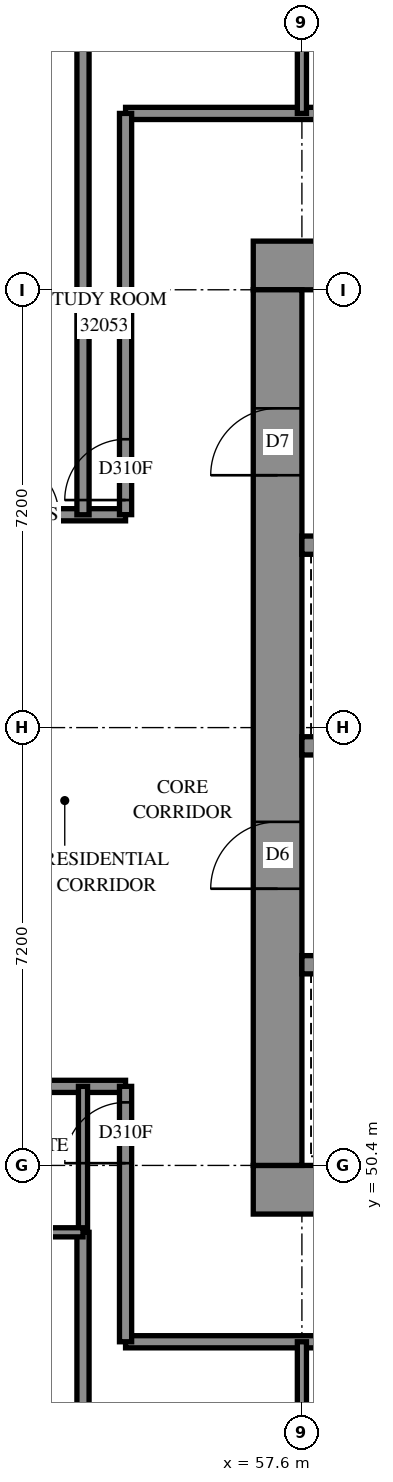
"""IFC4 building model, lengths in metres.
Left out: names, types, materials, properties, quantities, classifications, styles, units other than length and angle.
Written with IfcOpenShell. Run it as: python <this file> out.ifc"""

import sys

from ifc_helpers import new_model, si_unit, direction, frame, frame_2d, origin, place, context, subcontext, project, spatial, rectangle, extrude, element, fill, save


model = new_model("IFC4")
c1 = context("Model", 3, precision=1e-05, world=origin(), true_north=direction((0.0, 1.0)))
c2 = subcontext(c1, "Body", "Model", "MODEL_VIEW")
j1 = project(units=[si_unit("LENGTHUNIT", "METRE"), si_unit("PLANEANGLEUNIT", "RADIAN")], contexts=[c1])
p1 = place(None, origin())
s1 = spatial("IfcSite", under=j1, at=p1, CompositionType="ELEMENT")
p2 = place(p1, origin())
s2 = spatial("IfcBuilding", under=s1, at=p2, CompositionType="ELEMENT")
p3 = place(p2, frame((0.0, 0.0, 118.6)))
s3 = spatial("IfcBuildingStorey", under=s2, at=p3, CompositionType="ELEMENT", Elevation=118.6)
p4 = place(p3, frame((56.8, 50.0, -0.3), z_axis=(0.0, 0.0, 1.0), x_axis=(1.0, 0.0, 0.0)))
e1 = element("IfcWall", 1, at=p4, inside=s3, PredefinedType="SHEAR", context=c2, shape_type="SweptSolid", body=[
    extrude(rectangle(XDim=16.0, YDim=0.8, at=frame_2d((8.0, 0.0))), origin(), (0.0, 0.0, 1.0), 2.7),
])
p5 = place(p3, frame((56.8, 65.2, -0.3), z_axis=(0.0, 0.0, 1.0), x_axis=(1.0, 0.0, 0.0)))
e2 = element("IfcWall", 2, at=p5, inside=s3, PredefinedType="SHEAR", context=c2, shape_type="SweptSolid", body=[
    extrude(rectangle(XDim=16.0, YDim=0.8, at=frame_2d((8.0, 0.0))), origin(), (0.0, 0.0, 1.0), 2.7),
])
p6 = place(p5, frame((10.8, 0.0, 0.3)))
e3 = element("IfcOpeningElement", 3, at=p6, cuts=e2, PredefinedType="OPENING", context=c2, shape_type="SweptSolid", body=[
    extrude(rectangle(XDim=0.8, YDim=2.1, at=frame_2d((0.4, 1.05))), frame((0.0, 0.41, 0.0), z_axis=(0.0, -1.0, 0.0), x_axis=(1.0, 0.0, 0.0)), (0.0, 0.0, 1.0), 0.82),
])
p7 = place(p3, frame((57.2, 50.4, -0.3), z_axis=(0.0, 0.0, 1.0), x_axis=(0.0, 1.0, 0.0)))
e4 = element("IfcWall", 4, at=p7, inside=s3, PredefinedType="SHEAR", context=c2, shape_type="SweptSolid", body=[
    extrude(rectangle(XDim=14.4, YDim=0.8, at=frame_2d((7.2, 0.0))), origin(), (0.0, 0.0, 1.0), 2.7),
])
p8 = place(p7, frame((4.55, 0.0, 0.3)))
e5 = element("IfcOpeningElement", 5, at=p8, cuts=e4, PredefinedType="OPENING", context=c2, shape_type="SweptSolid", body=[
    extrude(rectangle(XDim=1.1, YDim=2.1, at=frame_2d((0.55, 1.05))), frame((0.0, 0.41, 0.0), z_axis=(0.0, -1.0, 0.0), x_axis=(1.0, 0.0, 0.0)), (0.0, 0.0, 1.0), 0.82),
])
p9 = place(p7, frame((11.35, 0.0, 0.3)))
e6 = element("IfcOpeningElement", 6, at=p9, cuts=e4, PredefinedType="OPENING", context=c2, shape_type="SweptSolid", body=[
    extrude(rectangle(XDim=1.1, YDim=2.1, at=frame_2d((0.55, 1.05))), frame((0.0, 0.41, 0.0), z_axis=(0.0, -1.0, 0.0), x_axis=(1.0, 0.0, 0.0)), (0.0, 0.0, 1.0), 0.82),
])
p10 = place(p3, frame((57.6, 53.7, 0.0), z_axis=(0.0, 0.0, 1.0), x_axis=(1.0, 0.0, 0.0)))
e7 = element("IfcWall", 7, at=p10, inside=s3, PredefinedType="SOLIDWALL", context=c2, shape_type="SweptSolid", body=[
    extrude(rectangle(XDim=14.4, YDim=0.3, at=frame_2d((7.2, 0.0))), origin(), (0.0, 0.0, 1.0), 3.1),
])
p11 = place(p10, frame((1.25, 0.0, 0.0)))
e8 = element("IfcOpeningElement", 8, at=p11, cuts=e7, PredefinedType="OPENING", context=c2, shape_type="SweptSolid", body=[
    extrude(rectangle(XDim=1.1, YDim=2.1, at=frame_2d((0.55, 1.05))), frame((0.0, 0.16, 0.0), z_axis=(0.0, -1.0, 0.0), x_axis=(1.0, 0.0, 0.0)), (0.0, 0.0, 1.0), 0.32),
])
p12 = place(p10, frame((4.85, 0.0, 0.0)))
e9 = element("IfcOpeningElement", 9, at=p12, cuts=e7, PredefinedType="OPENING", context=c2, shape_type="SweptSolid", body=[
    extrude(rectangle(XDim=1.1, YDim=2.1, at=frame_2d((0.55, 1.05))), frame((0.0, 0.16, 0.0), z_axis=(0.0, -1.0, 0.0), x_axis=(1.0, 0.0, 0.0)), (0.0, 0.0, 1.0), 0.32),
])
p13 = place(p10, frame((8.45, 0.0, 0.0)))
e10 = element("IfcOpeningElement", 10, at=p13, cuts=e7, PredefinedType="OPENING", context=c2, shape_type="SweptSolid", body=[
    extrude(rectangle(XDim=1.1, YDim=2.1, at=frame_2d((0.55, 1.05))), frame((0.0, 0.16, 0.0), z_axis=(0.0, -1.0, 0.0), x_axis=(1.0, 0.0, 0.0)), (0.0, 0.0, 1.0), 0.32),
])
p14 = place(p10, frame((12.05, 0.0, 0.0)))
e11 = element("IfcOpeningElement", 11, at=p14, cuts=e7, PredefinedType="OPENING", context=c2, shape_type="SweptSolid", body=[
    extrude(rectangle(XDim=1.1, YDim=2.1, at=frame_2d((0.55, 1.05))), frame((0.0, 0.16, 0.0), z_axis=(0.0, -1.0, 0.0), x_axis=(1.0, 0.0, 0.0)), (0.0, 0.0, 1.0), 0.32),
])
p15 = place(p3, frame((57.6, 57.3, 0.0), z_axis=(0.0, 0.0, 1.0), x_axis=(1.0, 0.0, 0.0)))
e12 = element("IfcWall", 12, at=p15, inside=s3, PredefinedType="SOLIDWALL", context=c2, shape_type="SweptSolid", body=[
    extrude(rectangle(XDim=14.4, YDim=0.3, at=frame_2d((7.2, 0.0))), origin(), (0.0, 0.0, 1.0), 3.1),
])
p16 = place(p15, frame((12.05, 0.0, 0.0)))
e13 = element("IfcOpeningElement", 13, at=p16, cuts=e12, PredefinedType="OPENING", context=c2, shape_type="SweptSolid", body=[
    extrude(rectangle(XDim=1.1, YDim=2.1, at=frame_2d((0.55, 1.05))), frame((0.0, 0.16, 0.0), z_axis=(0.0, -1.0, 0.0), x_axis=(1.0, 0.0, 0.0)), (0.0, 0.0, 1.0), 0.32),
])
p17 = place(p3, frame((57.6, 60.6, 0.0), z_axis=(0.0, 0.0, 1.0), x_axis=(1.0, 0.0, 0.0)))
e14 = element("IfcWall", 14, at=p17, inside=s3, PredefinedType="SOLIDWALL", context=c2, shape_type="SweptSolid", body=[
    extrude(rectangle(XDim=7.2, YDim=0.3, at=frame_2d((3.6, 0.0))), origin(), (0.0, 0.0, 1.0), 3.1),
])
p18 = place(p3, frame((33.502, 61.1, 0.0), z_axis=(0.0, 0.0, 1.0), x_axis=(1.0, 0.0, 0.0)))
e15 = element("IfcWall", 15, at=p18, inside=s3, PredefinedType="PARTITIONING", context=c2, shape_type="SweptSolid", body=[
    extrude(rectangle(XDim=21.198, YDim=0.2, at=frame_2d((10.599, 0.0))), origin(), (0.0, 0.0, 1.0), 3.1),
])
p19 = place(p18, frame((4.798, 0.0, 0.0)))
e16 = element("IfcOpeningElement", 16, at=p19, cuts=e15, PredefinedType="OPENING", context=c2, shape_type="SweptSolid", body=[
    extrude(rectangle(XDim=0.9, YDim=2.1, at=frame_2d((0.45, 1.05))), frame((0.0, 0.11, 0.0), z_axis=(0.0, -1.0, 0.0), x_axis=(1.0, 0.0, 0.0)), (0.0, 0.0, 1.0), 0.22),
])
p20 = place(p18, frame((6.498, 0.0, 0.0)))
e17 = element("IfcOpeningElement", 17, at=p20, cuts=e15, PredefinedType="OPENING", context=c2, shape_type="SweptSolid", body=[
    extrude(rectangle(XDim=0.9, YDim=2.1, at=frame_2d((0.45, 1.05))), frame((0.0, 0.11, 0.0), z_axis=(0.0, -1.0, 0.0), x_axis=(1.0, 0.0, 0.0)), (0.0, 0.0, 1.0), 0.22),
])
p21 = place(p18, frame((11.998, 0.0, 0.0)))
e18 = element("IfcOpeningElement", 18, at=p21, cuts=e15, PredefinedType="OPENING", context=c2, shape_type="SweptSolid", body=[
    extrude(rectangle(XDim=0.9, YDim=2.1, at=frame_2d((0.45, 1.05))), frame((0.0, 0.11, 0.0), z_axis=(0.0, -1.0, 0.0), x_axis=(1.0, 0.0, 0.0)), (0.0, 0.0, 1.0), 0.22),
])
p22 = place(p18, frame((13.698, 0.0, 0.0)))
e19 = element("IfcOpeningElement", 19, at=p22, cuts=e15, PredefinedType="OPENING", context=c2, shape_type="SweptSolid", body=[
    extrude(rectangle(XDim=0.9, YDim=2.1, at=frame_2d((0.45, 1.05))), frame((0.0, 0.11, 0.0), z_axis=(0.0, -1.0, 0.0), x_axis=(1.0, 0.0, 0.0)), (0.0, 0.0, 1.0), 0.22),
])
p23 = place(p18, frame((19.198, 0.0, 0.0)))
e20 = element("IfcOpeningElement", 20, at=p23, cuts=e15, PredefinedType="OPENING", context=c2, shape_type="SweptSolid", body=[
    extrude(rectangle(XDim=0.9, YDim=2.1, at=frame_2d((0.45, 1.05))), frame((0.0, 0.11, 0.0), z_axis=(0.0, -1.0, 0.0), x_axis=(1.0, 0.0, 0.0)), (0.0, 0.0, 1.0), 0.22),
])
p24 = place(p3, frame((54.7, 67.7, 0.0), z_axis=(0.0, 0.0, 1.0), x_axis=(1.0, 0.0, 0.0)))
e21 = element("IfcWall", 21, at=p24, inside=s3, PredefinedType="PARTITIONING", context=c2, shape_type="SweptSolid", body=[
    extrude(rectangle(XDim=20.2, YDim=0.2, at=frame_2d((10.1, 0.0))), origin(), (0.0, 0.0, 1.0), 3.1),
])
p25 = place(p24, frame((5.2, 0.0, 0.0)))
e22 = element("IfcOpeningElement", 22, at=p25, cuts=e21, PredefinedType="OPENING", context=c2, shape_type="SweptSolid", body=[
    extrude(rectangle(XDim=0.9, YDim=2.1, at=frame_2d((0.45, 1.05))), frame((0.0, 0.11, 0.0), z_axis=(0.0, -1.0, 0.0), x_axis=(1.0, 0.0, 0.0)), (0.0, 0.0, 1.0), 0.22),
])
p26 = place(p24, frame((8.838, 0.0, 0.0)))
e23 = element("IfcOpeningElement", 23, at=p26, cuts=e21, PredefinedType="OPENING", context=c2, shape_type="SweptSolid", body=[
    extrude(rectangle(XDim=1.0, YDim=2.1, at=frame_2d((0.5, 1.05))), frame((0.0, 0.11, 0.0), z_axis=(0.0, -1.0, 0.0), x_axis=(1.0, 0.0, 0.0)), (0.0, 0.0, 1.0), 0.22),
])
p27 = place(p24, frame((14.1, 0.0, 0.0)))
e24 = element("IfcOpeningElement", 24, at=p27, cuts=e21, PredefinedType="OPENING", context=c2, shape_type="SweptSolid", body=[
    extrude(rectangle(XDim=0.9, YDim=2.1, at=frame_2d((0.45, 1.05))), frame((0.0, 0.11, 0.0), z_axis=(0.0, -1.0, 0.0), x_axis=(1.0, 0.0, 0.0)), (0.0, 0.0, 1.0), 0.22),
])
p28 = place(p3, frame((54.7, 47.5, 0.0), z_axis=(0.0, 0.0, 1.0), x_axis=(1.0, 0.0, 0.0)))
e25 = element("IfcWall", 25, at=p28, inside=s3, PredefinedType="PARTITIONING", context=c2, shape_type="SweptSolid", body=[
    extrude(rectangle(XDim=19.442, YDim=0.2, at=frame_2d((9.721, 0.0))), origin(), (0.0, 0.0, 1.0), 3.1),
])
p29 = place(p28, frame((5.2, 0.0, 0.0)))
e26 = element("IfcOpeningElement", 26, at=p29, cuts=e25, PredefinedType="OPENING", context=c2, shape_type="SweptSolid", body=[
    extrude(rectangle(XDim=0.9, YDim=2.1, at=frame_2d((0.45, 1.05))), frame((0.0, 0.11, 0.0), z_axis=(0.0, -1.0, 0.0), x_axis=(1.0, 0.0, 0.0)), (0.0, 0.0, 1.0), 0.22),
])
p30 = place(p28, frame((8.757, 0.0, 0.0)))
e27 = element("IfcOpeningElement", 27, at=p30, cuts=e25, PredefinedType="OPENING", context=c2, shape_type="SweptSolid", body=[
    extrude(rectangle(XDim=0.9, YDim=2.1, at=frame_2d((0.45, 1.05))), frame((0.0, 0.11, 0.0), z_axis=(0.0, -1.0, 0.0), x_axis=(1.0, 0.0, 0.0)), (0.0, 0.0, 1.0), 0.22),
])
p31 = place(p28, frame((14.05, 0.0, 0.0)))
e28 = element("IfcOpeningElement", 28, at=p31, cuts=e25, PredefinedType="OPENING", context=c2, shape_type="SweptSolid", body=[
    extrude(rectangle(XDim=0.9, YDim=2.1, at=frame_2d((0.45, 1.05))), frame((0.0, 0.11, 0.0), z_axis=(0.0, -1.0, 0.0), x_axis=(1.0, 0.0, 0.0)), (0.0, 0.0, 1.0), 0.22),
])
p32 = place(p3, frame((54.0, 61.1, 0.0), z_axis=(0.0, 0.0, 1.0), x_axis=(0.0, 1.0, 0.0)))
e29 = element("IfcWall", 29, at=p32, inside=s3, PredefinedType="PARTITIONING", context=c2, shape_type="SweptSolid", body=[
    extrude(rectangle(XDim=11.625, YDim=0.2, at=frame_2d((5.813, 0.0))), origin(), (0.0, 0.0, 1.0), 3.1),
])
p33 = place(p3, frame((54.0, 42.3, 0.0), z_axis=(0.0, 0.0, 1.0), x_axis=(0.0, 1.0, 0.0)))
e30 = element("IfcWall", 30, at=p33, inside=s3, PredefinedType="PARTITIONING", context=c2, shape_type="SweptSolid", body=[
    extrude(rectangle(XDim=7.0, YDim=0.2, at=frame_2d((3.5, 0.0))), origin(), (0.0, 0.0, 1.0), 3.1),
])
p34 = place(p3, frame((54.7, 61.102, 0.0), z_axis=(0.0, 0.0, 1.0), x_axis=(0.0, 1.0, 0.0)))
e31 = element("IfcWall", 31, at=p34, inside=s3, PredefinedType="PARTITIONING", context=c2, shape_type="SweptSolid", body=[
    extrude(rectangle(XDim=6.598, YDim=0.2, at=frame_2d((3.299, 0.0))), origin(), (0.0, 0.0, 1.0), 3.1),
])
p35 = place(p34, frame((0.24, 0.0, 0.0)))
e32 = element("IfcOpeningElement", 32, at=p35, cuts=e31, PredefinedType="OPENING", context=c2, shape_type="SweptSolid", body=[
    extrude(rectangle(XDim=1.0, YDim=2.1, at=frame_2d((0.5, 1.05))), frame((0.0, 0.11, 0.0), z_axis=(0.0, -1.0, 0.0), x_axis=(1.0, 0.0, 0.0)), (0.0, 0.0, 1.0), 0.22),
])
p36 = place(p3, frame((50.4, 51.7, 0.0), z_axis=(0.0, 0.0, 1.0), x_axis=(1.0, 0.0, 0.0)))
e33 = element("IfcWall", 33, at=p36, inside=s3, PredefinedType="PARTITIONING", context=c2, shape_type="SweptSolid", body=[
    extrude(rectangle(XDim=4.3, YDim=0.2, at=frame_2d((2.15, 0.0))), origin(), (0.0, 0.0, 1.0), 3.1),
])
p37 = place(p36, frame((0.552, 0.0, 0.0)))
e34 = element("IfcOpeningElement", 34, at=p37, cuts=e33, PredefinedType="OPENING", context=c2, shape_type="SweptSolid", body=[
    extrude(rectangle(XDim=0.9, YDim=2.1, at=frame_2d((0.45, 1.05))), frame((0.0, 0.11, 0.0), z_axis=(0.0, -1.0, 0.0), x_axis=(1.0, 0.0, 0.0)), (0.0, 0.0, 1.0), 0.22),
])
p38 = place(p3, frame((54.7, 47.5, 0.0), z_axis=(0.0, 0.0, 1.0), x_axis=(0.0, 1.0, 0.0)))
e35 = element("IfcWall", 35, at=p38, inside=s3, PredefinedType="PARTITIONING", context=c2, shape_type="SweptSolid", body=[
    extrude(rectangle(XDim=4.2, YDim=0.2, at=frame_2d((2.1, 0.0))), origin(), (0.0, 0.0, 1.0), 3.1),
])
p39 = place(p38, frame((2.937, 0.0, 0.0)))
e36 = element("IfcOpeningElement", 36, at=p39, cuts=e35, PredefinedType="OPENING", context=c2, shape_type="SweptSolid", body=[
    extrude(rectangle(XDim=1.0, YDim=2.1, at=frame_2d((0.5, 1.05))), frame((0.0, 0.11, 0.0), z_axis=(0.0, -1.0, 0.0), x_axis=(1.0, 0.0, 0.0)), (0.0, 0.0, 1.0), 0.22),
])
for number, where, z_axis, x_axis in (
    (37, (54.0, 49.3, 0.0), (0.0, 0.0, 1.0), (0.0, 1.0, 0.0)),
    (38, (57.6, 45.1, 0.0), (0.0, 0.0, 1.0), (0.0, 1.0, 0.0)),
    (39, (57.6, 67.7, 0.0), (0.0, 0.0, 1.0), (0.0, 1.0, 0.0)),
):
    element("IfcWall", number, at=place(p3, frame(where, z_axis=z_axis, x_axis=x_axis)), inside=s3, PredefinedType="PARTITIONING", context=c2, shape_type="SweptSolid", body=[
        extrude(rectangle(XDim=2.4, YDim=0.15, at=frame_2d((1.2, 0.0))), origin(), (0.0, 0.0, 1.0), 3.1),
    ])
p40 = place(p3, frame((52.1, 49.3, 0.0), z_axis=(0.0, 0.0, 1.0), x_axis=(1.0, 0.0, 0.0)))
e40 = element("IfcWall", 40, at=p40, inside=s3, PredefinedType="PARTITIONING", context=c2, shape_type="SweptSolid", body=[
    extrude(rectangle(XDim=1.9, YDim=0.15, at=frame_2d((0.95, 0.0))), origin(), (0.0, 0.0, 1.0), 3.1),
])
p41 = place(p40, frame((0.493, 0.0, 0.0)))
e41 = element("IfcOpeningElement", 41, at=p41, cuts=e40, PredefinedType="OPENING", context=c2, shape_type="SweptSolid", body=[
    extrude(rectangle(XDim=0.8, YDim=2.1, at=frame_2d((0.4, 1.05))), frame((0.0, 0.085, 0.0), z_axis=(0.0, -1.0, 0.0), x_axis=(1.0, 0.0, 0.0)), (0.0, 0.0, 1.0), 0.17),
])
p42 = place(p8, origin())
e42 = element("IfcDoor", 42, at=p42, inside=s3, OperationType="DOUBLE_DOOR_SINGLE_SWING", PredefinedType="DOOR", context=c2, shape_type="SweptSolid", body=[
    extrude(rectangle(XDim=1.1, YDim=2.1, at=frame_2d((0.55, 1.05))), frame((0.0, 0.025, 0.0), z_axis=(0.0, -1.0, 0.0), x_axis=(1.0, 0.0, 0.0)), (0.0, 0.0, 1.0), 0.05),
])
fill(e5, e42)
p43 = place(p9, origin())
e43 = element("IfcDoor", 43, at=p43, inside=s3, OperationType="SINGLE_SWING_LEFT", PredefinedType="DOOR", context=c2, shape_type="SweptSolid", body=[
    extrude(rectangle(XDim=1.1, YDim=2.1, at=frame_2d((0.55, 1.05))), frame((0.0, 0.025, 0.0), z_axis=(0.0, -1.0, 0.0), x_axis=(1.0, 0.0, 0.0)), (0.0, 0.0, 1.0), 0.05),
])
fill(e6, e43)
p44 = place(p39, origin())
e44 = element("IfcDoor", 44, at=p44, inside=s3, OperationType="SINGLE_SWING_RIGHT", PredefinedType="DOOR", context=c2, shape_type="SweptSolid", body=[
    extrude(rectangle(XDim=1.0, YDim=2.1, at=frame_2d((0.5, 1.05))), frame((0.0, 0.025, 0.0), z_axis=(0.0, -1.0, 0.0), x_axis=(1.0, 0.0, 0.0)), (0.0, 0.0, 1.0), 0.05),
])
fill(e36, e44)
p45 = place(p23, origin())
e45 = element("IfcDoor", 45, at=p45, inside=s3, OperationType="SINGLE_SWING_RIGHT", PredefinedType="DOOR", context=c2, shape_type="SweptSolid", body=[
    extrude(rectangle(XDim=0.9, YDim=2.1, at=frame_2d((0.45, 1.05))), frame((0.0, 0.025, 0.0), z_axis=(0.0, -1.0, 0.0), x_axis=(1.0, 0.0, 0.0)), (0.0, 0.0, 1.0), 0.05),
])
fill(e20, e45)
p46 = place(p35, origin())
e46 = element("IfcDoor", 46, at=p46, inside=s3, OperationType="SINGLE_SWING_LEFT", PredefinedType="DOOR", context=c2, shape_type="SweptSolid", body=[
    extrude(rectangle(XDim=1.0, YDim=2.1, at=frame_2d((0.5, 1.05))), frame((0.0, 0.025, 0.0), z_axis=(0.0, -1.0, 0.0), x_axis=(1.0, 0.0, 0.0)), (0.0, 0.0, 1.0), 0.05),
])
fill(e32, e46)
save(model, sys.argv[1])
